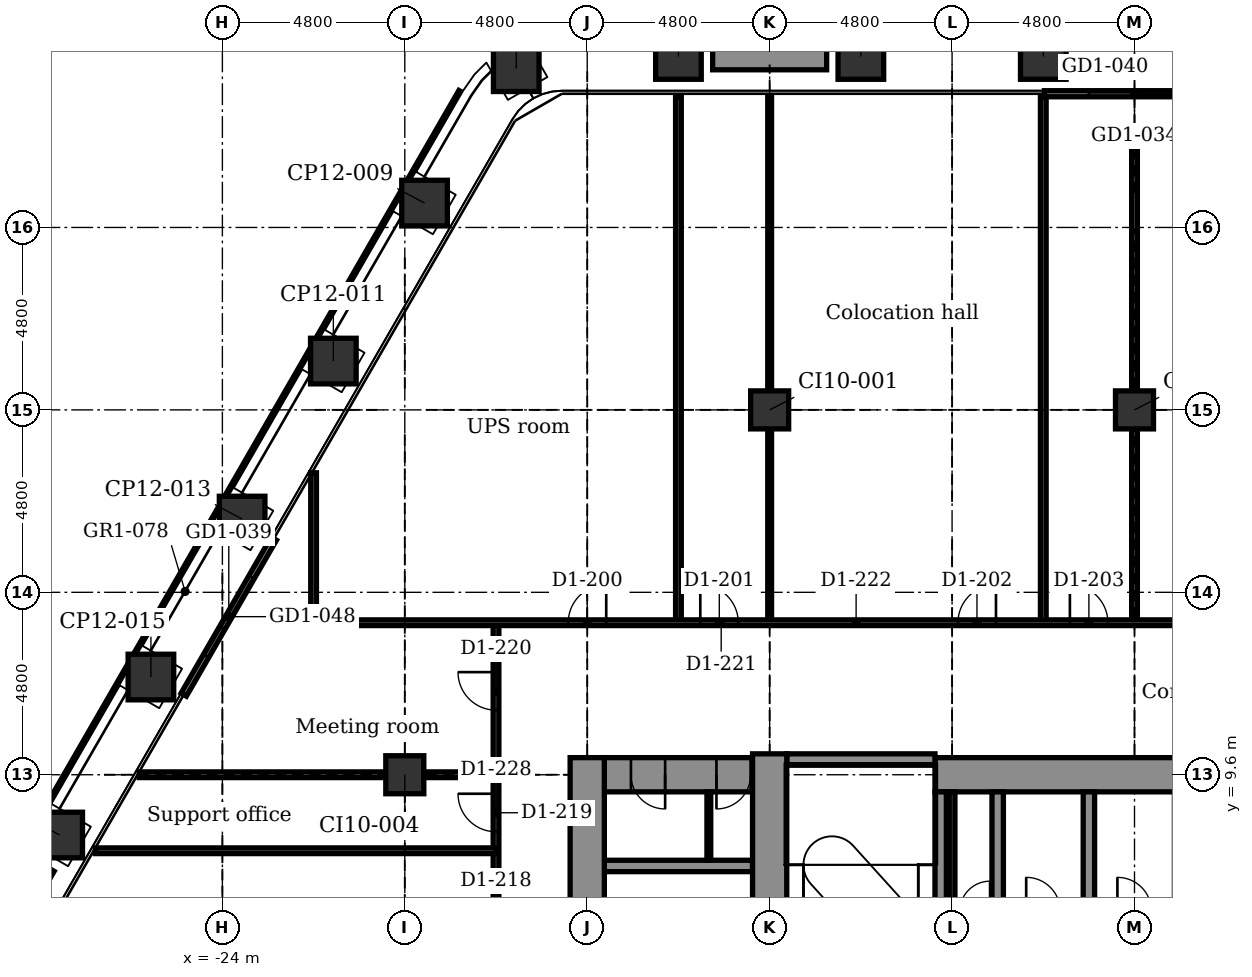
"""IFC4 building model, lengths in metres.
Left out: names, types, materials, properties, quantities, classifications, styles, units other than length and angle.
Written with IfcOpenShell. Run it as: python <this file> out.ifc"""

import sys

from ifc_helpers import new_model, si_unit, direction, frame, frame_2d, origin, origin_2d, place, context, subcontext, project, spatial, rectangle, extrude, element, fill, save


model = new_model("IFC4")
c1 = context("Model", 3, precision=1e-05, world=origin(), true_north=direction((0.0, 1.0)))
c2 = subcontext(c1, "Body", "Model", "MODEL_VIEW")
j1 = project(units=[si_unit("LENGTHUNIT", "METRE"), si_unit("PLANEANGLEUNIT", "RADIAN")], contexts=[c1])
p1 = place(None, origin())
s1 = spatial("IfcSite", under=j1, at=p1, CompositionType="ELEMENT")
p2 = place(p1, origin())
s2 = spatial("IfcBuilding", under=s1, at=p2, CompositionType="ELEMENT")
p3 = place(p2, frame((0.0, 0.0, 77.9)))
s3 = spatial("IfcBuildingStorey", under=s2, at=p3, CompositionType="ELEMENT", Elevation=77.9)
for number, where, z_axis, x_axis in (
    (1, (-16.268, 28.177, -0.2), (0.0, 0.0, 1.0), (0.866, 0.5, 0.0)),
    (2, (-12.0, 28.499, -0.2), (0.0, 0.0, 1.0), (1.0, 0.0, 0.0)),
    (3, (-7.2, 28.499, -0.2), (0.0, 0.0, 1.0), (1.0, 0.0, 0.0)),
    (4, (-2.4, 28.499, -0.2), (0.0, 0.0, 1.0), (1.0, 0.0, 0.0)),
    (5, (-28.28, 8.014, -0.2), (0.0, 0.0, 1.0), (0.5, 0.866, 0.0)),
    (6, (-25.88, 12.171, -0.2), (0.0, 0.0, 1.0), (0.5, 0.866, 0.0)),
    (7, (-23.48, 16.328, -0.2), (0.0, 0.0, 1.0), (0.5, 0.866, 0.0)),
    (8, (-21.08, 20.485, -0.2), (0.0, 0.0, 1.0), (0.5, 0.866, 0.0)),
    (9, (-18.68, 24.642, -0.2), (0.0, 0.0, 1.0), (0.5, 0.866, 0.0)),
):
    element("IfcColumn", number, at=place(p3, frame(where, z_axis=z_axis, x_axis=x_axis)), inside=s3, PredefinedType="COLUMN", context=c2, shape_type="SweptSolid", body=[
        extrude(rectangle(XDim=1.2, YDim=1.2, at=origin_2d()), origin(), (0.0, 0.0, 1.0), 4.5),
    ])
for number, where, z_axis, x_axis in (
    (10, (-19.2, 9.6, -0.2), (0.0, 0.0, 1.0), (1.0, 0.0, 0.0)),
    (11, (-9.6, 19.2, -0.2), (0.0, 0.0, 1.0), (1.0, 0.0, 0.0)),
    (12, (0.0, 19.2, -0.2), (0.0, 0.0, 1.0), (1.0, 0.0, 0.0)),
):
    element("IfcColumn", number, at=place(p3, frame(where, z_axis=z_axis, x_axis=x_axis)), inside=s3, PredefinedType="COLUMN", context=c2, shape_type="SweptSolid", body=[
        extrude(rectangle(XDim=1.0, YDim=1.0, at=origin_2d()), origin(), (0.0, 0.0, 1.0), 4.5),
    ])
p4 = place(p3, frame((-13.95, 7.2, -0.2), z_axis=(0.0, 0.0, 1.0), x_axis=(1.0, 0.0, 0.0)))
e13 = element("IfcWall", 13, at=p4, inside=s3, PredefinedType="STANDARD", context=c2, shape_type="SweptSolid", body=[
    extrude(rectangle(XDim=3.9, YDim=0.3, at=frame_2d((1.95, 0.0))), origin(), (0.0, 0.0, 1.0), 4.5),
])
p5 = place(p3, frame((-13.95, 9.6, -0.2), z_axis=(0.0, 0.0, 1.0), x_axis=(1.0, 0.0, 0.0)))
e14 = element("IfcWall", 14, at=p5, inside=s3, PredefinedType="SHEAR", context=c2, shape_type="SweptSolid", body=[
    extrude(rectangle(XDim=3.9, YDim=0.9, at=frame_2d((1.95, 0.0))), origin(), (0.0, 0.0, 1.0), 4.5),
])
p6 = place(p5, frame((0.7, 0.0, 0.2)))
e15 = element("IfcOpeningElement", 15, at=p6, cuts=e14, PredefinedType="OPENING", context=c2, shape_type="SweptSolid", body=[
    extrude(rectangle(XDim=0.9, YDim=2.1, at=frame_2d((0.45, 1.05))), frame((0.0, 0.46, 0.0), z_axis=(0.0, -1.0, 0.0), x_axis=(1.0, 0.0, 0.0)), (0.0, 0.0, 1.0), 0.92),
])
p7 = place(p5, frame((2.95, 0.0, 0.2)))
e16 = element("IfcOpeningElement", 16, at=p7, cuts=e14, PredefinedType="OPENING", context=c2, shape_type="SweptSolid", body=[
    extrude(rectangle(XDim=0.9, YDim=2.1, at=frame_2d((0.45, 1.05))), frame((0.0, 0.46, 0.0), z_axis=(0.0, -1.0, 0.0), x_axis=(1.0, 0.0, 0.0)), (0.0, 0.0, 1.0), 0.92),
])
p8 = place(p3, frame((-5.25, 9.6, -0.2), z_axis=(0.0, 0.0, 1.0), x_axis=(1.0, 0.0, 0.0)))
e17 = element("IfcWall", 17, at=p8, inside=s3, PredefinedType="SHEAR", context=c2, shape_type="SweptSolid", body=[
    extrude(rectangle(XDim=14.4, YDim=0.9, at=frame_2d((7.2, 0.0))), origin(), (0.0, 0.0, 1.0), 4.5),
])
p9 = place(p8, frame((9.35, 0.0, 0.2)))
e18 = element("IfcOpeningElement", 18, at=p9, cuts=e17, PredefinedType="OPENING", context=c2, shape_type="SweptSolid", body=[
    extrude(rectangle(XDim=1.4, YDim=2.1, at=frame_2d((0.7, 1.05))), frame((0.0, 0.46, 0.0), z_axis=(0.0, -1.0, 0.0), x_axis=(1.0, 0.0, 0.0)), (0.0, 0.0, 1.0), 0.92),
])
p10 = place(p3, frame((-9.15, 10.0, -0.2), z_axis=(0.0, 0.0, 1.0), x_axis=(1.0, 0.0, 0.0)))
e19 = element("IfcWall", 19, at=p10, inside=s3, PredefinedType="STANDARD", context=c2, shape_type="SweptSolid", body=[
    extrude(rectangle(XDim=3.9, YDim=0.3, at=frame_2d((1.95, 0.0))), origin(), (0.0, 0.0, 1.0), 4.5),
])
p11 = place(p3, frame((-14.4, -10.05, -0.2), z_axis=(0.0, 0.0, 1.0), x_axis=(0.0, 1.0, 0.0)))
e20 = element("IfcWall", 20, at=p11, inside=s3, PredefinedType="SHEAR", context=c2, shape_type="SweptSolid", body=[
    extrude(rectangle(XDim=20.1, YDim=0.9, at=frame_2d((10.05, 0.0))), origin(), (0.0, 0.0, 1.0), 4.5),
])
p12 = place(p11, frame((3.5, 0.0, 0.2)))
e21 = element("IfcOpeningElement", 21, at=p12, cuts=e20, PredefinedType="OPENING", context=c2, shape_type="SweptSolid", body=[
    extrude(rectangle(XDim=1.1, YDim=2.1, at=frame_2d((0.55, 1.05))), frame((0.0, 0.46, 0.0), z_axis=(0.0, -1.0, 0.0), x_axis=(1.0, 0.0, 0.0)), (0.0, 0.0, 1.0), 0.92),
])
p13 = place(p11, frame((5.9, 0.0, 0.2)))
e22 = element("IfcOpeningElement", 22, at=p13, cuts=e20, PredefinedType="OPENING", context=c2, shape_type="SweptSolid", body=[
    extrude(rectangle(XDim=1.1, YDim=2.1, at=frame_2d((0.55, 1.05))), frame((0.0, 0.46, 0.0), z_axis=(0.0, -1.0, 0.0), x_axis=(1.0, 0.0, 0.0)), (0.0, 0.0, 1.0), 0.92),
])
p14 = place(p11, frame((8.3, 0.0, 0.2)))
e23 = element("IfcOpeningElement", 23, at=p14, cuts=e20, PredefinedType="OPENING", context=c2, shape_type="SweptSolid", body=[
    extrude(rectangle(XDim=1.1, YDim=2.1, at=frame_2d((0.55, 1.05))), frame((0.0, 0.46, 0.0), z_axis=(0.0, -1.0, 0.0), x_axis=(1.0, 0.0, 0.0)), (0.0, 0.0, 1.0), 0.92),
])
p15 = place(p11, frame((10.7, 0.0, 0.2)))
e24 = element("IfcOpeningElement", 24, at=p15, cuts=e20, PredefinedType="OPENING", context=c2, shape_type="SweptSolid", body=[
    extrude(rectangle(XDim=1.1, YDim=2.1, at=frame_2d((0.55, 1.05))), frame((0.0, 0.46, 0.0), z_axis=(0.0, -1.0, 0.0), x_axis=(1.0, 0.0, 0.0)), (0.0, 0.0, 1.0), 0.92),
])
p16 = place(p3, frame((-9.6, 2.55, -0.2), z_axis=(0.0, 0.0, 1.0), x_axis=(0.0, 1.0, 0.0)))
e25 = element("IfcWall", 25, at=p16, inside=s3, PredefinedType="SHEAR", context=c2, shape_type="SweptSolid", body=[
    extrude(rectangle(XDim=7.6, YDim=0.9, at=frame_2d((3.8, 0.0))), origin(), (0.0, 0.0, 1.0), 4.5),
])
p17 = place(p3, frame((-5.1, 2.25, -0.2), z_axis=(0.0, 0.0, 1.0), x_axis=(0.0, 1.0, 0.0)))
e26 = element("IfcWall", 26, at=p17, inside=s3, PredefinedType="STANDARD", context=c2, shape_type="SweptSolid", body=[
    extrude(rectangle(XDim=6.9, YDim=0.3, at=frame_2d((3.45, 0.0))), origin(), (0.0, 0.0, 1.0), 4.5),
])
p18 = place(p17, frame((2.0, 0.0, 0.2)))
e27 = element("IfcOpeningElement", 27, at=p18, cuts=e26, PredefinedType="OPENING", context=c2, shape_type="SweptSolid", body=[
    extrude(rectangle(XDim=1.2, YDim=2.1, at=frame_2d((0.6, 1.05))), frame((0.0, 0.16, 0.0), z_axis=(0.0, -1.0, 0.0), x_axis=(1.0, 0.0, 0.0)), (0.0, 0.0, 1.0), 0.32),
])
for number, where, z_axis, x_axis in (
    (28, (-3.6, 5.85, -0.2), (0.0, 0.0, 1.0), (0.0, 1.0, 0.0)),
    (29, (-1.2, 5.85, -0.2), (0.0, 0.0, 1.0), (0.0, 1.0, 0.0)),
):
    element("IfcWall", number, at=place(p3, frame(where, z_axis=z_axis, x_axis=x_axis)), inside=s3, PredefinedType="STANDARD", context=c2, shape_type="SweptSolid", body=[
        extrude(rectangle(XDim=3.3, YDim=0.3, at=frame_2d((1.65, 0.0))), origin(), (0.0, 0.0, 1.0), 4.5),
    ])
p19 = place(p3, frame((-2.37, 27.519, 0.0), z_axis=(0.0, 0.0, 1.0), x_axis=(1.0, 0.0, 0.0)))
e30 = element("IfcWall", 30, at=p19, inside=s3, PredefinedType="PARTITIONING", context=c2, shape_type="SweptSolid", body=[
    extrude(rectangle(XDim=4.74, YDim=0.16, at=frame_2d((2.37, 0.0))), origin(), (0.0, 0.0, 1.0), 4.3),
])
p20 = place(p19, frame((1.17, 0.0, 0.0)))
e31 = element("IfcOpeningElement", 31, at=p20, cuts=e30, PredefinedType="OPENING", context=c2, shape_type="SweptSolid", body=[
    extrude(rectangle(XDim=2.4, YDim=2.4, at=frame_2d((1.2, 1.2))), frame((0.0, 0.09, 0.0), z_axis=(0.0, -1.0, 0.0), x_axis=(1.0, 0.0, 0.0)), (0.0, 0.0, 1.0), 0.18),
])
p21 = place(p3, frame((-25.017, 11.707, 0.0), z_axis=(0.0, 0.0, 1.0), x_axis=(0.499978080042, 0.866038058908, 0.0)))
e32 = element("IfcWall", 32, at=p21, inside=s3, PredefinedType="PARTITIONING", context=c2, shape_type="SweptSolid", body=[
    extrude(rectangle(XDim=4.74, YDim=0.16, at=frame_2d((2.37, 0.0))), origin(), (0.0, 0.0, 1.0), 4.3),
])
p22 = place(p21, frame((1.17, 0.0, 0.0)))
e33 = element("IfcOpeningElement", 33, at=p22, cuts=e32, PredefinedType="OPENING", context=c2, shape_type="SweptSolid", body=[
    extrude(rectangle(XDim=2.4, YDim=2.4, at=frame_2d((1.2, 1.2))), frame((0.0, 0.09, 0.0), z_axis=(0.0, -1.0, 0.0), x_axis=(1.0, 0.0, 0.0)), (0.0, 0.0, 1.0), 0.18),
])
for number, where, z_axis, x_axis in (
    (34, (-11.1, 28.448, 0.0), (0.0, 0.0, 1.0), (1.0, 0.0, 0.0)),
    (35, (-30.187, 4.611, 0.0), (0.0, 0.0, 1.0), (0.5, 0.866, 0.0)),
):
    element("IfcWall", number, at=place(p3, frame(where, z_axis=z_axis, x_axis=x_axis)), inside=s3, PredefinedType="USERDEFINED", context=c2, shape_type="SweptSolid", body=[
        extrude(rectangle(XDim=3.0, YDim=0.6, at=frame_2d((1.5, 0.0))), origin(), (0.0, 0.0, 1.0), 0.7),
    ])
p23 = place(p3, frame((0.0, 13.6, 0.0), z_axis=(0.0, 0.0, 1.0), x_axis=(0.0, 1.0, 0.0)))
e36 = element("IfcWall", 36, at=p23, inside=s3, PredefinedType="PARTITIONING", context=c2, shape_type="SweptSolid", body=[
    extrude(rectangle(XDim=5.1, YDim=0.15, at=frame_2d((2.55, 0.0))), origin(), (0.0, 0.0, 1.0), 3.843),
])
p24 = place(p3, frame((0.0, 19.7, 0.0), z_axis=(0.0, 0.0, 1.0), x_axis=(0.0, 1.0, 0.0)))
e37 = element("IfcWall", 37, at=p24, inside=s3, PredefinedType="PARTITIONING", context=c2, shape_type="SweptSolid", body=[
    extrude(rectangle(XDim=6.619, YDim=0.15, at=frame_2d((3.309, 0.0))), origin(), (0.0, 0.0, 1.0), 3.843),
])
p25 = place(p3, frame((-2.4, 13.6, 0.0), z_axis=(0.0, 0.0, 1.0), x_axis=(0.0, 1.0, 0.0)))
e38 = element("IfcWall", 38, at=p25, inside=s3, PredefinedType="PARTITIONING", context=c2, shape_type="SweptSolid", body=[
    extrude(rectangle(XDim=13.838, YDim=0.15, at=frame_2d((6.919, 0.0))), origin(), (0.0, 0.0, 1.0), 4.3),
])
p26 = place(p3, frame((-4.8, 6.0, 0.0), z_axis=(0.0, 0.0, 1.0), x_axis=(0.0, 1.0, 0.0)))
e39 = element("IfcWall", 39, at=p26, inside=s3, PredefinedType="PARTITIONING", context=c2, shape_type="SweptSolid", body=[
    extrude(rectangle(XDim=3.15, YDim=0.15, at=frame_2d((1.575, 0.0))), origin(), (0.0, 0.0, 1.0), 4.3),
])
p27 = place(p3, frame((-9.6, 13.6, 0.0), z_axis=(0.0, 0.0, 1.0), x_axis=(0.0, 1.0, 0.0)))
e40 = element("IfcWall", 40, at=p27, inside=s3, PredefinedType="PARTITIONING", context=c2, shape_type="SweptSolid", body=[
    extrude(rectangle(XDim=5.1, YDim=0.1, at=frame_2d((2.55, 0.0))), origin(), (0.0, 0.0, 1.0), 3.843),
])
p28 = place(p3, frame((-9.6, 19.7, 0.0), z_axis=(0.0, 0.0, 1.0), x_axis=(0.0, 1.0, 0.0)))
e41 = element("IfcWall", 41, at=p28, inside=s3, PredefinedType="PARTITIONING", context=c2, shape_type="SweptSolid", body=[
    extrude(rectangle(XDim=7.729, YDim=0.1, at=frame_2d((3.864, 0.0))), origin(), (0.0, 0.0, 1.0), 3.843),
])
p29 = place(p3, frame((-11.2, 7.35, 0.0), z_axis=(0.0, 0.0, 1.0), x_axis=(0.0, 1.0, 0.0)))
e42 = element("IfcWall", 42, at=p29, inside=s3, PredefinedType="PARTITIONING", context=c2, shape_type="SweptSolid", body=[
    extrude(rectangle(XDim=1.8, YDim=0.1, at=frame_2d((0.9, 0.0))), origin(), (0.0, 0.0, 1.0), 4.3),
])
p30 = place(p3, frame((-12.0, 13.6, 0.0), z_axis=(0.0, 0.0, 1.0), x_axis=(0.0, 1.0, 0.0)))
e43 = element("IfcWall", 43, at=p30, inside=s3, PredefinedType="PARTITIONING", context=c2, shape_type="SweptSolid", body=[
    extrude(rectangle(XDim=13.828, YDim=0.15, at=frame_2d((6.914, 0.0))), origin(), (0.0, 0.0, 1.0), 4.3),
])
p31 = place(p3, frame((-16.8, 3.95, 0.0), z_axis=(0.0, 0.0, 1.0), x_axis=(0.0, 1.0, 0.0)))
e44 = element("IfcWall", 44, at=p31, inside=s3, PredefinedType="PARTITIONING", context=c2, shape_type="SweptSolid", body=[
    extrude(rectangle(XDim=9.65, YDim=0.15, at=frame_2d((4.825, 0.0))), origin(), (0.0, 0.0, 1.0), 4.3),
])
p32 = place(p31, frame((1.25, 0.0, 0.0)))
e45 = element("IfcOpeningElement", 45, at=p32, cuts=e44, PredefinedType="OPENING", context=c2, shape_type="SweptSolid", body=[
    extrude(rectangle(XDim=1.0, YDim=2.1, at=frame_2d((0.5, 1.05))), frame((0.0, 0.085, 0.0), z_axis=(0.0, -1.0, 0.0), x_axis=(1.0, 0.0, 0.0)), (0.0, 0.0, 1.0), 0.17),
])
p33 = place(p31, frame((4.15, 0.0, 0.0)))
e46 = element("IfcOpeningElement", 46, at=p33, cuts=e44, PredefinedType="OPENING", context=c2, shape_type="SweptSolid", body=[
    extrude(rectangle(XDim=1.0, YDim=2.1, at=frame_2d((0.5, 1.05))), frame((0.0, 0.085, 0.0), z_axis=(0.0, -1.0, 0.0), x_axis=(1.0, 0.0, 0.0)), (0.0, 0.0, 1.0), 0.17),
])
p34 = place(p31, frame((7.35, 0.0, 0.0)))
e47 = element("IfcOpeningElement", 47, at=p34, cuts=e44, PredefinedType="OPENING", context=c2, shape_type="SweptSolid", body=[
    extrude(rectangle(XDim=1.0, YDim=2.1, at=frame_2d((0.5, 1.05))), frame((0.0, 0.085, 0.0), z_axis=(0.0, -1.0, 0.0), x_axis=(1.0, 0.0, 0.0)), (0.0, 0.0, 1.0), 0.17),
])
p35 = place(p3, frame((-21.6, 13.6, 0.0), z_axis=(0.0, 0.0, 1.0), x_axis=(0.0, 1.0, 0.0)))
e48 = element("IfcWall", 48, at=p35, inside=s3, PredefinedType="PARTITIONING", context=c2, shape_type="SweptSolid", body=[
    extrude(rectangle(XDim=3.945, YDim=0.15, at=frame_2d((1.972, 0.0))), origin(), (0.0, 0.0, 1.0), 4.3),
])
p36 = place(p3, frame((-27.342, 7.6, 0.0), z_axis=(0.0, 0.0, 1.0), x_axis=(1.0, 0.0, 0.0)))
e49 = element("IfcWall", 49, at=p36, inside=s3, PredefinedType="PARTITIONING", context=c2, shape_type="SweptSolid", body=[
    extrude(rectangle(XDim=10.542, YDim=0.15, at=frame_2d((5.271, 0.0))), origin(), (0.0, 0.0, 1.0), 4.3),
])
p37 = place(p3, frame((-26.187, 9.6, 0.0), z_axis=(0.0, 0.0, 1.0), x_axis=(1.0, 0.0, 0.0)))
e50 = element("IfcWall", 50, at=p37, inside=s3, PredefinedType="PARTITIONING", context=c2, shape_type="SweptSolid", body=[
    extrude(rectangle(XDim=6.487, YDim=0.15, at=frame_2d((3.243, 0.0))), origin(), (0.0, 0.0, 1.0), 3.692),
])
p38 = place(p3, frame((-18.7, 9.6, 0.0), z_axis=(0.0, 0.0, 1.0), x_axis=(1.0, 0.0, 0.0)))
e51 = element("IfcWall", 51, at=p38, inside=s3, PredefinedType="PARTITIONING", context=c2, shape_type="SweptSolid", body=[
    extrude(rectangle(XDim=1.9, YDim=0.15, at=frame_2d((0.95, 0.0))), origin(), (0.0, 0.0, 1.0), 3.692),
])
p39 = place(p3, frame((-21.6, 13.6, 0.0), z_axis=(0.0, 0.0, 1.0), x_axis=(1.0, 0.0, 0.0)))
e52 = element("IfcWall", 52, at=p39, inside=s3, PredefinedType="PARTITIONING", context=c2, shape_type="SweptSolid", body=[
    extrude(rectangle(XDim=43.2, YDim=0.15, at=frame_2d((21.6, 0.0))), origin(), (0.0, 0.0, 1.0), 4.3),
])
p40 = place(p39, frame((6.7, 0.0, 0.0)))
e53 = element("IfcOpeningElement", 53, at=p40, cuts=e52, PredefinedType="OPENING", context=c2, shape_type="SweptSolid", body=[
    extrude(rectangle(XDim=1.0, YDim=2.1, at=frame_2d((0.5, 1.05))), frame((0.0, 0.085, 0.0), z_axis=(0.0, -1.0, 0.0), x_axis=(1.0, 0.0, 0.0)), (0.0, 0.0, 1.0), 0.17),
])
p41 = place(p39, frame((10.175, 0.0, 0.0)))
e54 = element("IfcOpeningElement", 54, at=p41, cuts=e52, PredefinedType="OPENING", context=c2, shape_type="SweptSolid", body=[
    extrude(rectangle(XDim=1.0, YDim=2.1, at=frame_2d((0.5, 1.05))), frame((0.0, 0.085, 0.0), z_axis=(0.0, -1.0, 0.0), x_axis=(1.0, 0.0, 0.0)), (0.0, 0.0, 1.0), 0.17),
])
p42 = place(p39, frame((16.955, 0.0, 0.0)))
e55 = element("IfcOpeningElement", 55, at=p42, cuts=e52, PredefinedType="OPENING", context=c2, shape_type="SweptSolid", body=[
    extrude(rectangle(XDim=1.0, YDim=2.1, at=frame_2d((0.5, 1.05))), frame((0.0, 0.085, 0.0), z_axis=(0.0, -1.0, 0.0), x_axis=(1.0, 0.0, 0.0)), (0.0, 0.0, 1.0), 0.17),
])
p43 = place(p39, frame((19.9, 0.0, 0.0)))
e56 = element("IfcOpeningElement", 56, at=p43, cuts=e52, PredefinedType="OPENING", context=c2, shape_type="SweptSolid", body=[
    extrude(rectangle(XDim=1.0, YDim=2.1, at=frame_2d((0.5, 1.05))), frame((0.0, 0.085, 0.0), z_axis=(0.0, -1.0, 0.0), x_axis=(1.0, 0.0, 0.0)), (0.0, 0.0, 1.0), 0.17),
])
p44 = place(p39, frame((25.9, 0.0, 0.0)))
e57 = element("IfcOpeningElement", 57, at=p44, cuts=e52, PredefinedType="OPENING", context=c2, shape_type="SweptSolid", body=[
    extrude(rectangle(XDim=1.0, YDim=2.1, at=frame_2d((0.5, 1.05))), frame((0.0, 0.085, 0.0), z_axis=(0.0, -1.0, 0.0), x_axis=(1.0, 0.0, 0.0)), (0.0, 0.0, 1.0), 0.17),
])
p45 = place(p39, frame((33.505, 0.0, 0.0)))
e58 = element("IfcOpeningElement", 58, at=p45, cuts=e52, PredefinedType="OPENING", context=c2, shape_type="SweptSolid", body=[
    extrude(rectangle(XDim=1.0, YDim=2.1, at=frame_2d((0.5, 1.05))), frame((0.0, 0.085, 0.0), z_axis=(0.0, -1.0, 0.0), x_axis=(1.0, 0.0, 0.0)), (0.0, 0.0, 1.0), 0.17),
])
p46 = place(p20, origin())
e59 = element("IfcDoor", 59, at=p46, inside=s3, OperationType="DOUBLE_DOOR_SLIDING", PredefinedType="DOOR", context=c2, shape_type="SweptSolid", body=[
    extrude(rectangle(XDim=2.4, YDim=2.4, at=frame_2d((1.2, 1.2))), frame((0.0, 0.025, 0.0), z_axis=(0.0, -1.0, 0.0), x_axis=(1.0, 0.0, 0.0)), (0.0, 0.0, 1.0), 0.05),
])
fill(e31, e59)
p47 = place(p22, origin())
e60 = element("IfcDoor", 60, at=p47, inside=s3, OperationType="DOUBLE_DOOR_SLIDING", PredefinedType="DOOR", context=c2, shape_type="SweptSolid", body=[
    extrude(rectangle(XDim=2.4, YDim=2.4, at=frame_2d((1.2, 1.2))), frame((0.0, 0.025, 0.0), z_axis=(0.0, -1.0, 0.0), x_axis=(1.0, 0.0, 0.0)), (0.0, 0.0, 1.0), 0.05),
])
fill(e33, e60)
p48 = place(p40, origin())
e61 = element("IfcDoor", 61, at=p48, inside=s3, OperationType="SINGLE_SWING_RIGHT", PredefinedType="DOOR", context=c2, shape_type="SweptSolid", body=[
    extrude(rectangle(XDim=1.0, YDim=2.1, at=frame_2d((0.5, 1.05))), frame((0.0, 0.025, 0.0), z_axis=(0.0, -1.0, 0.0), x_axis=(1.0, 0.0, 0.0)), (0.0, 0.0, 1.0), 0.05),
])
fill(e53, e61)
p49 = place(p41, origin())
e62 = element("IfcDoor", 62, at=p49, inside=s3, OperationType="SINGLE_SWING_LEFT", PredefinedType="DOOR", context=c2, shape_type="SweptSolid", body=[
    extrude(rectangle(XDim=1.0, YDim=2.1, at=frame_2d((0.5, 1.05))), frame((0.0, 0.025, 0.0), z_axis=(0.0, -1.0, 0.0), x_axis=(1.0, 0.0, 0.0)), (0.0, 0.0, 1.0), 0.05),
])
fill(e54, e62)
p50 = place(p42, origin())
e63 = element("IfcDoor", 63, at=p50, inside=s3, OperationType="SINGLE_SWING_RIGHT", PredefinedType="DOOR", context=c2, shape_type="SweptSolid", body=[
    extrude(rectangle(XDim=1.0, YDim=2.1, at=frame_2d((0.5, 1.05))), frame((0.0, 0.025, 0.0), z_axis=(0.0, -1.0, 0.0), x_axis=(1.0, 0.0, 0.0)), (0.0, 0.0, 1.0), 0.05),
])
fill(e55, e63)
p51 = place(p43, origin())
e64 = element("IfcDoor", 64, at=p51, inside=s3, OperationType="SINGLE_SWING_LEFT", PredefinedType="DOOR", context=c2, shape_type="SweptSolid", body=[
    extrude(rectangle(XDim=1.0, YDim=2.1, at=frame_2d((0.5, 1.05))), frame((0.0, 0.025, 0.0), z_axis=(0.0, -1.0, 0.0), x_axis=(1.0, 0.0, 0.0)), (0.0, 0.0, 1.0), 0.05),
])
fill(e56, e64)
p52 = place(p33, origin())
e65 = element("IfcDoor", 65, at=p52, inside=s3, OperationType="SINGLE_SWING_RIGHT", PredefinedType="DOOR", context=c2, shape_type="SweptSolid", body=[
    extrude(rectangle(XDim=1.0, YDim=2.1, at=frame_2d((0.5, 1.05))), frame((0.0, 0.025, 0.0), z_axis=(0.0, -1.0, 0.0), x_axis=(1.0, 0.0, 0.0)), (0.0, 0.0, 1.0), 0.05),
])
fill(e46, e65)
p53 = place(p34, origin())
e66 = element("IfcDoor", 66, at=p53, inside=s3, OperationType="SINGLE_SWING_RIGHT", PredefinedType="DOOR", context=c2, shape_type="SweptSolid", body=[
    extrude(rectangle(XDim=1.0, YDim=2.1, at=frame_2d((0.5, 1.05))), frame((0.0, 0.025, 0.0), z_axis=(0.0, -1.0, 0.0), x_axis=(1.0, 0.0, 0.0)), (0.0, 0.0, 1.0), 0.05),
])
fill(e47, e66)
p54 = place(p6, frame((0.9, 0.0, 0.0), z_axis=(0.0, 0.0, 1.0), x_axis=(-1.0, 0.0, 0.0)))
e67 = element("IfcDoor", 67, at=p54, inside=s3, OperationType="SINGLE_SWING_RIGHT", PredefinedType="DOOR", context=c2, shape_type="SweptSolid", body=[
    extrude(rectangle(XDim=0.9, YDim=2.1, at=frame_2d((0.45, 1.05))), frame((0.0, 0.025, 0.0), z_axis=(0.0, -1.0, 0.0), x_axis=(1.0, 0.0, 0.0)), (0.0, 0.0, 1.0), 0.05),
])
fill(e15, e67)
p55 = place(p7, frame((0.9, 0.0, 0.0), z_axis=(0.0, 0.0, 1.0), x_axis=(-1.0, 0.0, 0.0)))
e68 = element("IfcDoor", 68, at=p55, inside=s3, OperationType="SINGLE_SWING_LEFT", PredefinedType="DOOR", context=c2, shape_type="SweptSolid", body=[
    extrude(rectangle(XDim=0.9, YDim=2.1, at=frame_2d((0.45, 1.05))), frame((0.0, 0.025, 0.0), z_axis=(0.0, -1.0, 0.0), x_axis=(1.0, 0.0, 0.0)), (0.0, 0.0, 1.0), 0.05),
])
fill(e16, e68)
save(model, sys.argv[1])
